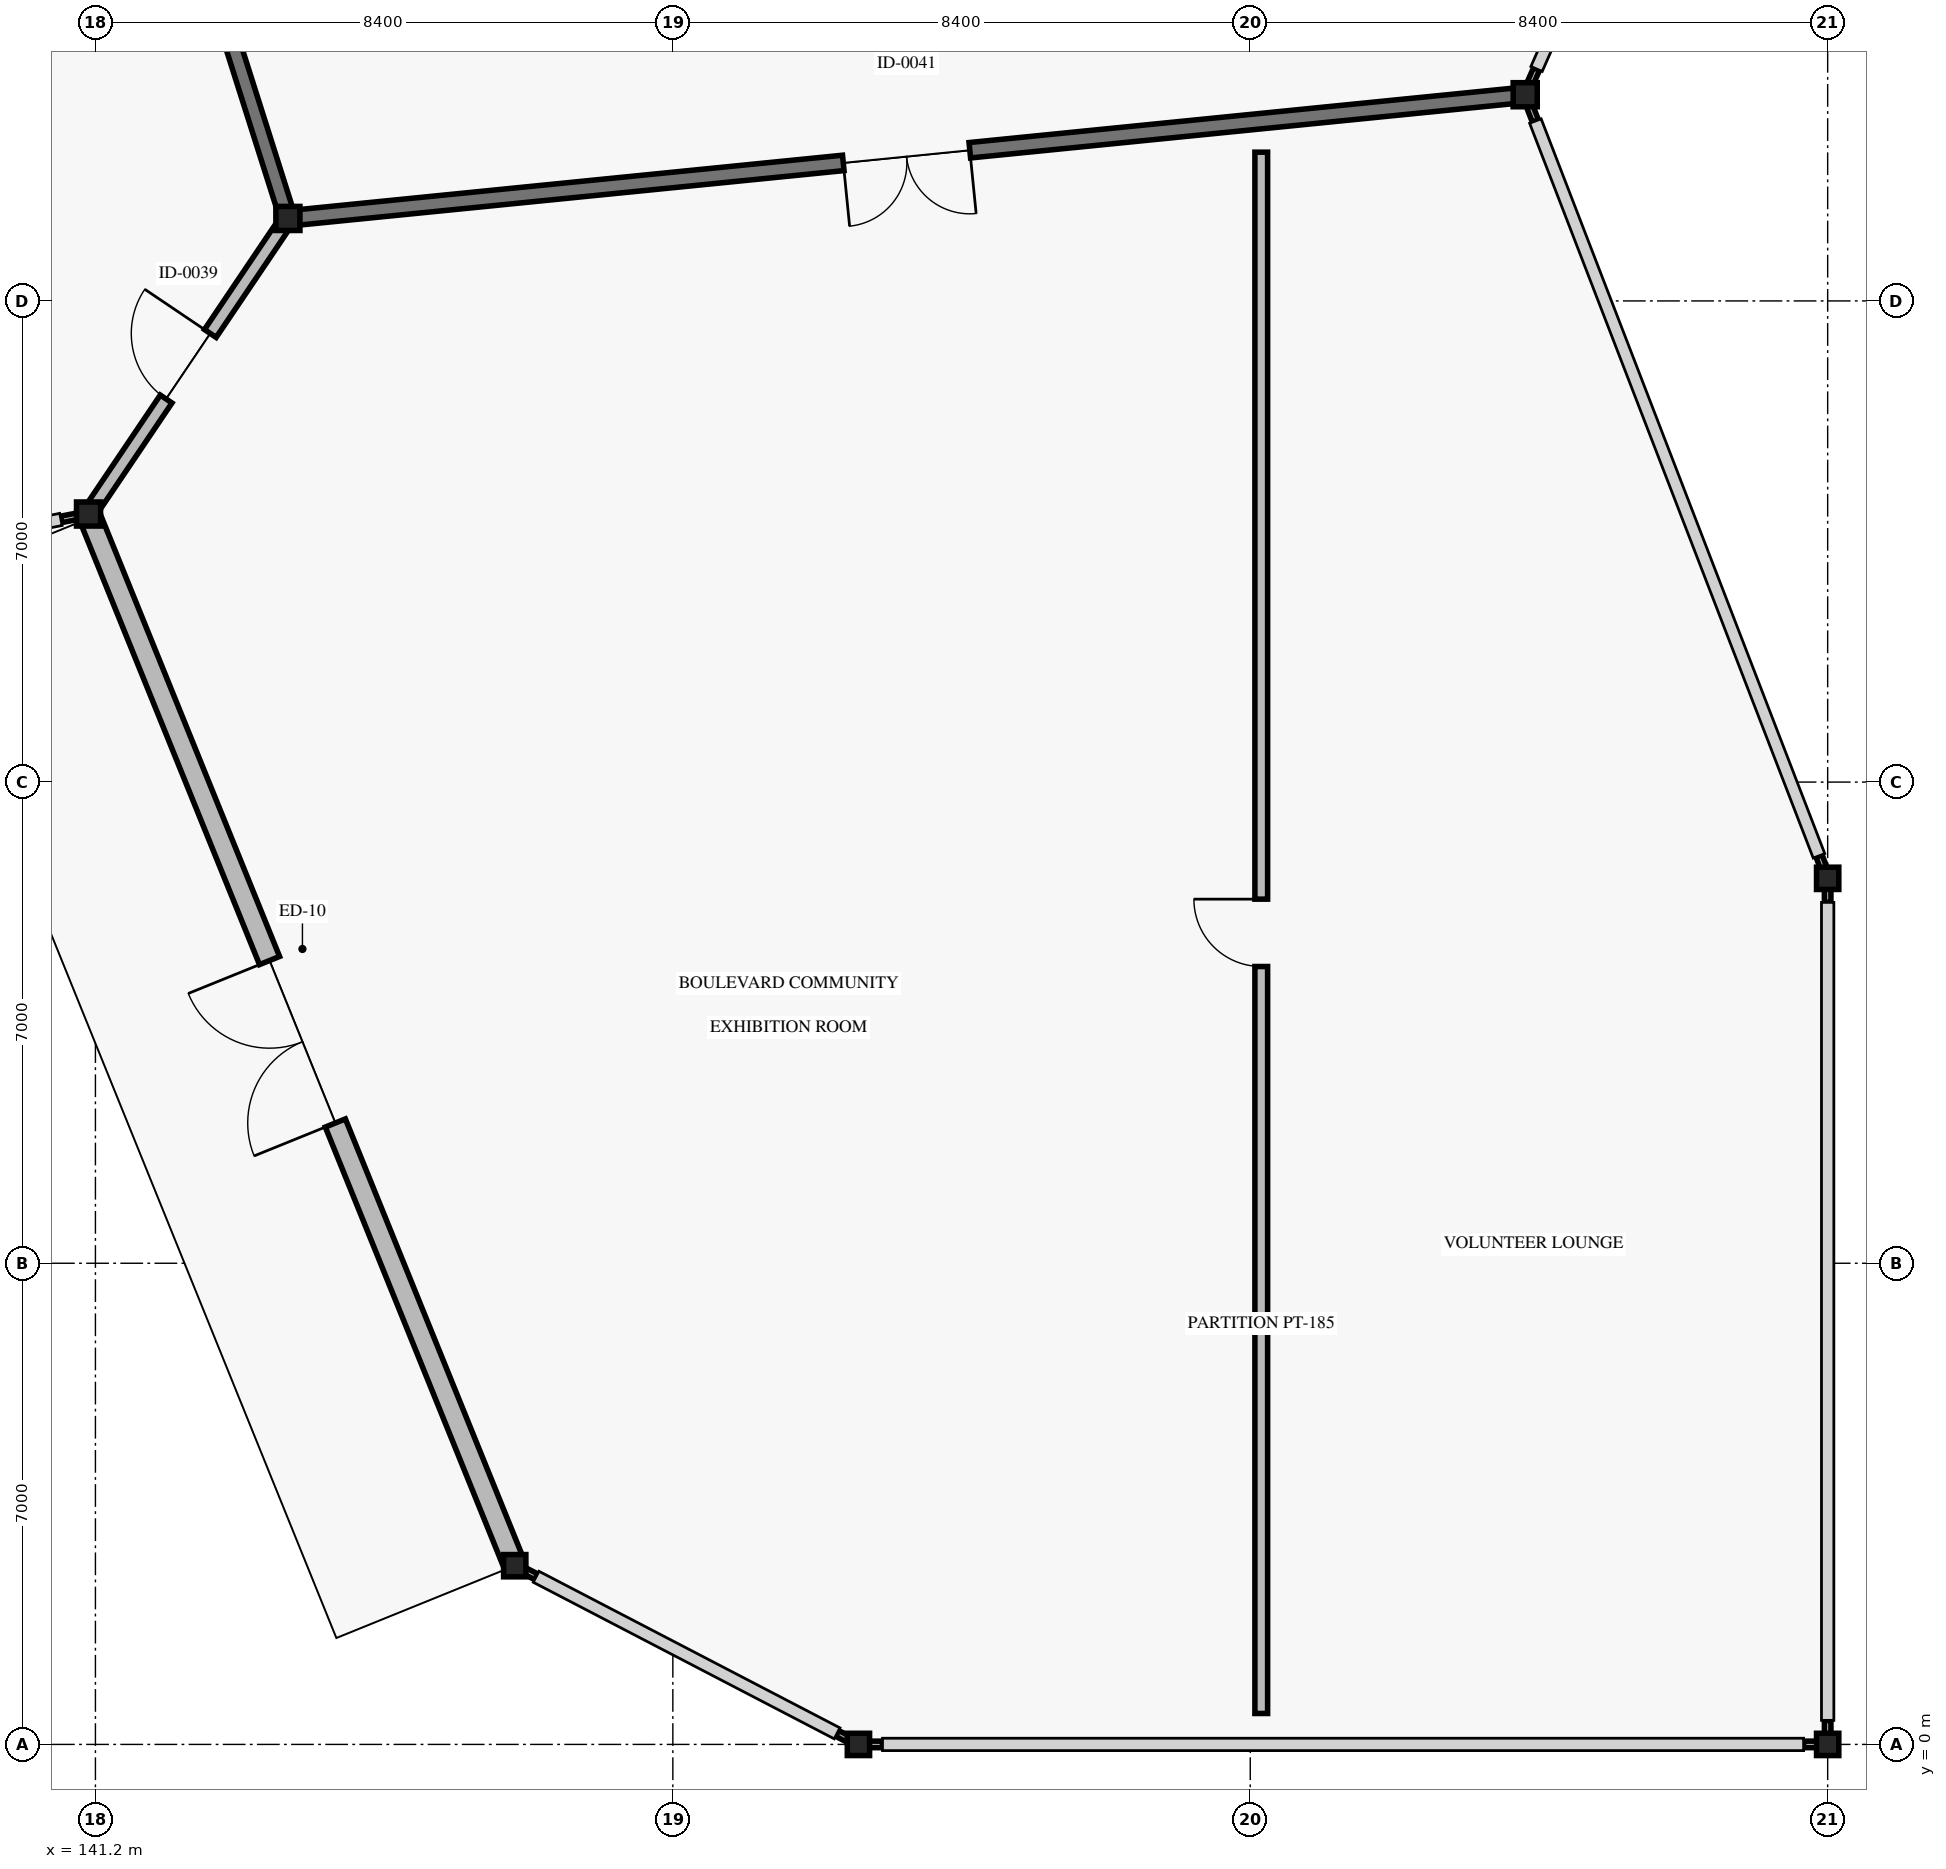
"""IFC4 building model, lengths in metres.
Left out: names, types, materials, properties, quantities, classifications, styles, units other than length and angle.
Written with IfcOpenShell. Run it as: python <this file> out.ifc"""

import sys

from ifc_helpers import new_model, si_unit, direction, frame, frame_2d, origin, origin_2d, place, context, subcontext, project, spatial, rectangle, hollow_circle, i_section, extrude, element, fill, save


model = new_model("IFC4")
c1 = context("Model", 3, precision=1e-05, world=origin(), true_north=direction((0.0, 1.0)))
c2 = subcontext(c1, "Body", "Model", "MODEL_VIEW")
j1 = project(units=[si_unit("LENGTHUNIT", "METRE"), si_unit("PLANEANGLEUNIT", "RADIAN")], contexts=[c1])
p1 = place(None, origin())
s1 = spatial("IfcSite", under=j1, at=p1, CompositionType="ELEMENT")
p2 = place(p1, origin())
s2 = spatial("IfcBuilding", under=s1, at=p2, CompositionType="ELEMENT")
p3 = place(p2, origin())
s3 = spatial("IfcBuildingStorey", under=s2, at=p3, CompositionType="ELEMENT", Elevation=0.0)
for number, where, z_axis, x_axis in (
    (1, (141.1, 17.9, 0.0), (0.0, 0.0, 1.0), (1.0, 0.0, 0.0)),
    (2, (144.0, 22.2, 0.0), (0.0, 0.0, 1.0), (1.0, 0.0, 0.0)),
):
    element("IfcColumn", number, at=place(p3, frame(where, z_axis=z_axis, x_axis=x_axis)), inside=s3, PredefinedType="COLUMN", context=c2, shape_type="SweptSolid", body=[
        extrude(i_section(OverallWidth=0.35, OverallDepth=0.35, WebThickness=0.02, FlangeThickness=0.028, at=origin_2d()), origin(), (0.0, 0.0, 1.0), 5.4),
    ])
for number, where, z_axis, x_axis in (
    (3, (147.3, 2.6, 0.0), (0.0, 0.0, 1.0), (1.0, 0.0, 0.0)),
    (4, (152.3, 0.0, 0.0), (0.0, 0.0, 1.0), (1.0, 0.0, 0.0)),
):
    element("IfcColumn", number, at=place(p3, frame(where, z_axis=z_axis, x_axis=x_axis)), inside=s3, PredefinedType="COLUMN", context=c2, shape_type="SweptSolid", body=[
        extrude(hollow_circle(Radius=0.162, WallThickness=0.01, at=origin_2d()), origin(), (0.0, 0.0, 1.0), 5.4),
    ])
p4 = place(p3, frame((162.0, 24.0, 0.0), z_axis=(0.0, 0.0, 1.0), x_axis=(1.0, 0.0, 0.0)))
e5 = element("IfcColumn", 5, at=p4, inside=s3, PredefinedType="COLUMN", context=c2, shape_type="SweptSolid", body=[
    extrude(i_section(OverallWidth=0.35, OverallDepth=0.35, WebThickness=0.02, FlangeThickness=0.028, at=origin_2d()), origin(), (0.0, 0.0, 1.0), 5.4),
])
for number, where, z_axis, x_axis in (
    (6, (166.4, 0.0, 0.0), (0.0, 0.0, 1.0), (1.0, 0.0, 0.0)),
    (7, (166.4, 12.6, 0.0), (0.0, 0.0, 1.0), (1.0, 0.0, 0.0)),
):
    element("IfcColumn", number, at=place(p3, frame(where, z_axis=z_axis, x_axis=x_axis)), inside=s3, PredefinedType="COLUMN", context=c2, shape_type="SweptSolid", body=[
        extrude(hollow_circle(Radius=0.162, WallThickness=0.01, at=origin_2d()), origin(), (0.0, 0.0, 1.0), 5.4),
    ])
p5 = place(p3, frame((141.0, 17.88, 0.0), z_axis=(0.0, 0.0, 1.0), x_axis=(-0.981545118721, -0.19123069815, 0.0)))
e8 = element("IfcWall", 8, at=p5, inside=s3, PredefinedType="SOLIDWALL", context=c2, shape_type="SweptSolid", body=[
    extrude(rectangle(XDim=0.308, YDim=0.095, at=frame_2d((0.154, 0.0))), origin(), (0.0, 0.0, 1.0), 4.22),
])
p6 = place(p3, frame((147.3, 2.6, 0.0), z_axis=(0.0, 0.0, 1.0), x_axis=(-0.375550747937, 0.92680183196, 0.0)))
e9 = element("IfcWall", 9, at=p6, inside=s3, PredefinedType="SOLIDWALL", context=c2, shape_type="SweptSolid", body=[
    extrude(rectangle(XDim=16.448, YDim=0.315, at=frame_2d((8.224, 0.0))), origin(), (0.0, 0.0, 1.0), 4.22),
])
p7 = place(p6, frame((6.949, 0.0, 0.0)))
e10 = element("IfcOpeningElement", 10, at=p7, cuts=e9, PredefinedType="OPENING", context=c2, shape_type="SweptSolid", body=[
    extrude(rectangle(XDim=2.55, YDim=2.5, at=frame_2d((1.275, 1.25))), frame((0.0, 0.167, 0.0), z_axis=(0.0, -1.0, 0.0), x_axis=(1.0, 0.0, 0.0)), (0.0, 0.0, 1.0), 0.335),
])
p8 = place(p3, frame((152.263, 0.019, 0.0), z_axis=(0.0, 0.0, 1.0), x_axis=(-0.888005951379, 0.45983195878, 0.0)))
e11 = element("IfcWall", 11, at=p8, inside=s3, PredefinedType="SOLIDWALL", context=c2, shape_type="SweptSolid", body=[
    extrude(rectangle(XDim=0.309, YDim=0.095, at=frame_2d((0.154, 0.0))), origin(), (0.0, 0.0, 1.0), 4.22),
])
p9 = place(p3, frame((147.611, 2.439, 0.0), z_axis=(0.0, 0.0, 1.0), x_axis=(-0.887850239649, 0.460132537378, 0.0)))
e12 = element("IfcWall", 12, at=p9, inside=s3, PredefinedType="SOLIDWALL", context=c2, shape_type="SweptSolid", body=[
    extrude(rectangle(XDim=0.309, YDim=0.095, at=frame_2d((0.154, 0.0))), origin(), (0.0, 0.0, 1.0), 4.22),
])
for number, where, z_axis, x_axis in (
    (13, (166.358, 0.0, 0.0), (0.0, 0.0, 1.0), (-1.0, 0.0, 0.0)),
    (14, (152.65, 0.0, 0.0), (0.0, 0.0, 1.0), (-1.0, 0.0, 0.0)),
):
    element("IfcWall", number, at=place(p3, frame(where, z_axis=z_axis, x_axis=x_axis)), inside=s3, PredefinedType="SOLIDWALL", context=c2, shape_type="SweptSolid", body=[
        extrude(rectangle(XDim=0.308, YDim=0.095, at=frame_2d((0.154, 0.0))), origin(), (0.0, 0.0, 1.0), 4.22),
    ])
for number, where, z_axis, x_axis in (
    (15, (166.4, 12.558, 0.0), (0.0, 0.0, 1.0), (0.0, -1.0, 0.0)),
    (16, (166.4, 0.35, 0.0), (0.0, 0.0, 1.0), (0.0, -1.0, 0.0)),
):
    element("IfcWall", number, at=place(p3, frame(where, z_axis=z_axis, x_axis=x_axis)), inside=s3, PredefinedType="SOLIDWALL", context=c2, shape_type="SweptSolid", body=[
        extrude(rectangle(XDim=0.308, YDim=0.095, at=frame_2d((0.154, 0.0))), origin(), (0.0, 0.0, 1.0), 4.22),
    ])
p10 = place(p3, frame((162.037, 23.905, 0.0), z_axis=(0.0, 0.0, 1.0), x_axis=(0.359085078765, -0.933304830271, 0.0)))
e17 = element("IfcWall", 17, at=p10, inside=s3, PredefinedType="SOLIDWALL", context=c2, shape_type="SweptSolid", body=[
    extrude(rectangle(XDim=0.309, YDim=0.095, at=frame_2d((0.154, 0.0))), origin(), (0.0, 0.0, 1.0), 4.22),
])
p11 = place(p3, frame((166.274, 12.927, 0.0), z_axis=(0.0, 0.0, 1.0), x_axis=(0.359773736497, -0.933039580365, 0.0)))
e18 = element("IfcWall", 18, at=p11, inside=s3, PredefinedType="SOLIDWALL", context=c2, shape_type="SweptSolid", body=[
    extrude(rectangle(XDim=0.309, YDim=0.095, at=frame_2d((0.154, 0.0))), origin(), (0.0, 0.0, 1.0), 4.22),
])
p12 = place(p3, frame((162.165, 24.375, 0.0), z_axis=(0.0, 0.0, 1.0), x_axis=(-0.402605813257, -0.915373453369, 0.0)))
e19 = element("IfcWall", 19, at=p12, inside=s3, PredefinedType="SOLIDWALL", context=c2, shape_type="SweptSolid", body=[
    extrude(rectangle(XDim=0.308, YDim=0.095, at=frame_2d((0.154, 0.0))), origin(), (0.0, 0.0, 1.0), 4.22),
])
p13 = place(p3, frame((141.1, 17.9, 0.0), z_axis=(0.0, 0.0, 1.0), x_axis=(0.559124361662, 0.829083800467, 0.0)))
e20 = element("IfcWall", 20, at=p13, inside=s3, PredefinedType="SOLIDWALL", context=c2, shape_type="SweptSolid", body=[
    extrude(rectangle(XDim=5.187, YDim=0.205, at=frame_2d((2.593, 0.0))), origin(), (0.0, 0.0, 1.0), 3.92),
])
p14 = place(p13, frame((2.018, 0.0, 0.0)))
e21 = element("IfcOpeningElement", 21, at=p14, cuts=e20, PredefinedType="OPENING", context=c2, shape_type="SweptSolid", body=[
    extrude(rectangle(XDim=1.15, YDim=2.2, at=frame_2d((0.575, 1.1))), frame((0.0, 0.113, 0.0), z_axis=(0.0, -1.0, 0.0), x_axis=(1.0, 0.0, 0.0)), (0.0, 0.0, 1.0), 0.225),
])
p15 = place(p3, frame((144.0, 22.2, 0.0), z_axis=(0.0, 0.0, 1.0), x_axis=(-0.302243860734, 0.953230637699, 0.0)))
e22 = element("IfcWall", 22, at=p15, inside=s3, PredefinedType="SOLIDWALL", context=c2, shape_type="SweptSolid", body=[
    extrude(rectangle(XDim=21.506, YDim=0.225, at=frame_2d((10.753, 0.0))), origin(), (0.0, 0.0, 1.0), 4.62),
])
p16 = place(p15, frame((12.679, 0.0, 0.0)))
e23 = element("IfcOpeningElement", 23, at=p16, cuts=e22, PredefinedType="OPENING", context=c2, shape_type="SweptSolid", body=[
    extrude(rectangle(XDim=2.0, YDim=2.5, at=frame_2d((1.0, 1.25))), frame((0.0, 0.123, 0.0), z_axis=(0.0, -1.0, 0.0), x_axis=(1.0, 0.0, 0.0)), (0.0, 0.0, 1.0), 0.245),
])
p17 = place(p3, frame((162.0, 24.0, 0.0), z_axis=(0.0, 0.0, 1.0), x_axis=(-0.995036922958, -0.099506391506, 0.0)))
e24 = element("IfcWall", 24, at=p17, inside=s3, PredefinedType="SOLIDWALL", context=c2, shape_type="SweptSolid", body=[
    extrude(rectangle(XDim=18.09, YDim=0.225, at=frame_2d((9.045, 0.0))), origin(), (0.0, 0.0, 1.0), 4.62),
])
p18 = place(p17, frame((8.12, 0.0, 0.0)))
e25 = element("IfcOpeningElement", 25, at=p18, cuts=e24, PredefinedType="OPENING", context=c2, shape_type="SweptSolid", body=[
    extrude(rectangle(XDim=1.85, YDim=2.4, at=frame_2d((0.925, 1.2))), frame((0.0, 0.123, 0.0), z_axis=(0.0, -1.0, 0.0), x_axis=(1.0, 0.0, 0.0)), (0.0, 0.0, 1.0), 0.245),
])
p19 = place(p3, frame((158.16, 0.45, 0.0), z_axis=(0.0, 0.0, 1.0), x_axis=(0.0, 1.0, 0.0)))
e26 = element("IfcWall", 26, at=p19, inside=s3, PredefinedType="PARTITIONING", context=c2, shape_type="SweptSolid", body=[
    extrude(rectangle(XDim=22.714, YDim=0.185, at=frame_2d((11.357, 0.0))), origin(), (0.0, 0.0, 1.0), 3.92),
])
p20 = place(p19, frame((10.867, 0.0, 0.0)))
e27 = element("IfcOpeningElement", 27, at=p20, cuts=e26, PredefinedType="OPENING", context=c2, shape_type="SweptSolid", body=[
    extrude(rectangle(XDim=0.98, YDim=2.15, at=frame_2d((0.49, 1.075))), frame((0.0, 0.103, 0.0), z_axis=(0.0, -1.0, 0.0), x_axis=(1.0, 0.0, 0.0)), (0.0, 0.0, 1.0), 0.205),
])
p21 = place(p7, origin())
e28 = element("IfcDoor", 28, at=p21, inside=s3, OperationType="DOUBLE_DOOR_SINGLE_SWING", PredefinedType="DOOR", context=c2, shape_type="SweptSolid", body=[
    extrude(rectangle(XDim=2.55, YDim=2.5, at=frame_2d((1.275, 1.25))), frame((0.0, 0.025, 0.0), z_axis=(0.0, -1.0, 0.0), x_axis=(1.0, 0.0, 0.0)), (0.0, 0.0, 1.0), 0.05),
])
fill(e10, e28)
p22 = place(p14, origin())
e29 = element("IfcDoor", 29, at=p22, inside=s3, OperationType="SINGLE_SWING_RIGHT", PredefinedType="DOOR", context=c2, shape_type="SweptSolid", body=[
    extrude(rectangle(XDim=1.15, YDim=2.2, at=frame_2d((0.575, 1.1))), frame((0.0, 0.025, 0.0), z_axis=(0.0, -1.0, 0.0), x_axis=(1.0, 0.0, 0.0)), (0.0, 0.0, 1.0), 0.05),
])
fill(e21, e29)
p23 = place(p18, origin())
e30 = element("IfcDoor", 30, at=p23, inside=s3, OperationType="DOUBLE_DOOR_SINGLE_SWING", PredefinedType="DOOR", context=c2, shape_type="SweptSolid", body=[
    extrude(rectangle(XDim=1.85, YDim=2.4, at=frame_2d((0.925, 1.2))), frame((0.0, 0.025, 0.0), z_axis=(0.0, -1.0, 0.0), x_axis=(1.0, 0.0, 0.0)), (0.0, 0.0, 1.0), 0.05),
])
fill(e25, e30)
p24 = place(p20, origin())
e31 = element("IfcDoor", 31, at=p24, inside=s3, OperationType="SINGLE_SWING_RIGHT", PredefinedType="DOOR", context=c2, shape_type="SweptSolid", body=[
    extrude(rectangle(XDim=0.98, YDim=2.15, at=frame_2d((0.49, 1.075))), frame((0.0, 0.025, 0.0), z_axis=(0.0, -1.0, 0.0), x_axis=(1.0, 0.0, 0.0)), (0.0, 0.0, 1.0), 0.05),
])
fill(e27, e31)
save(model, sys.argv[1])
